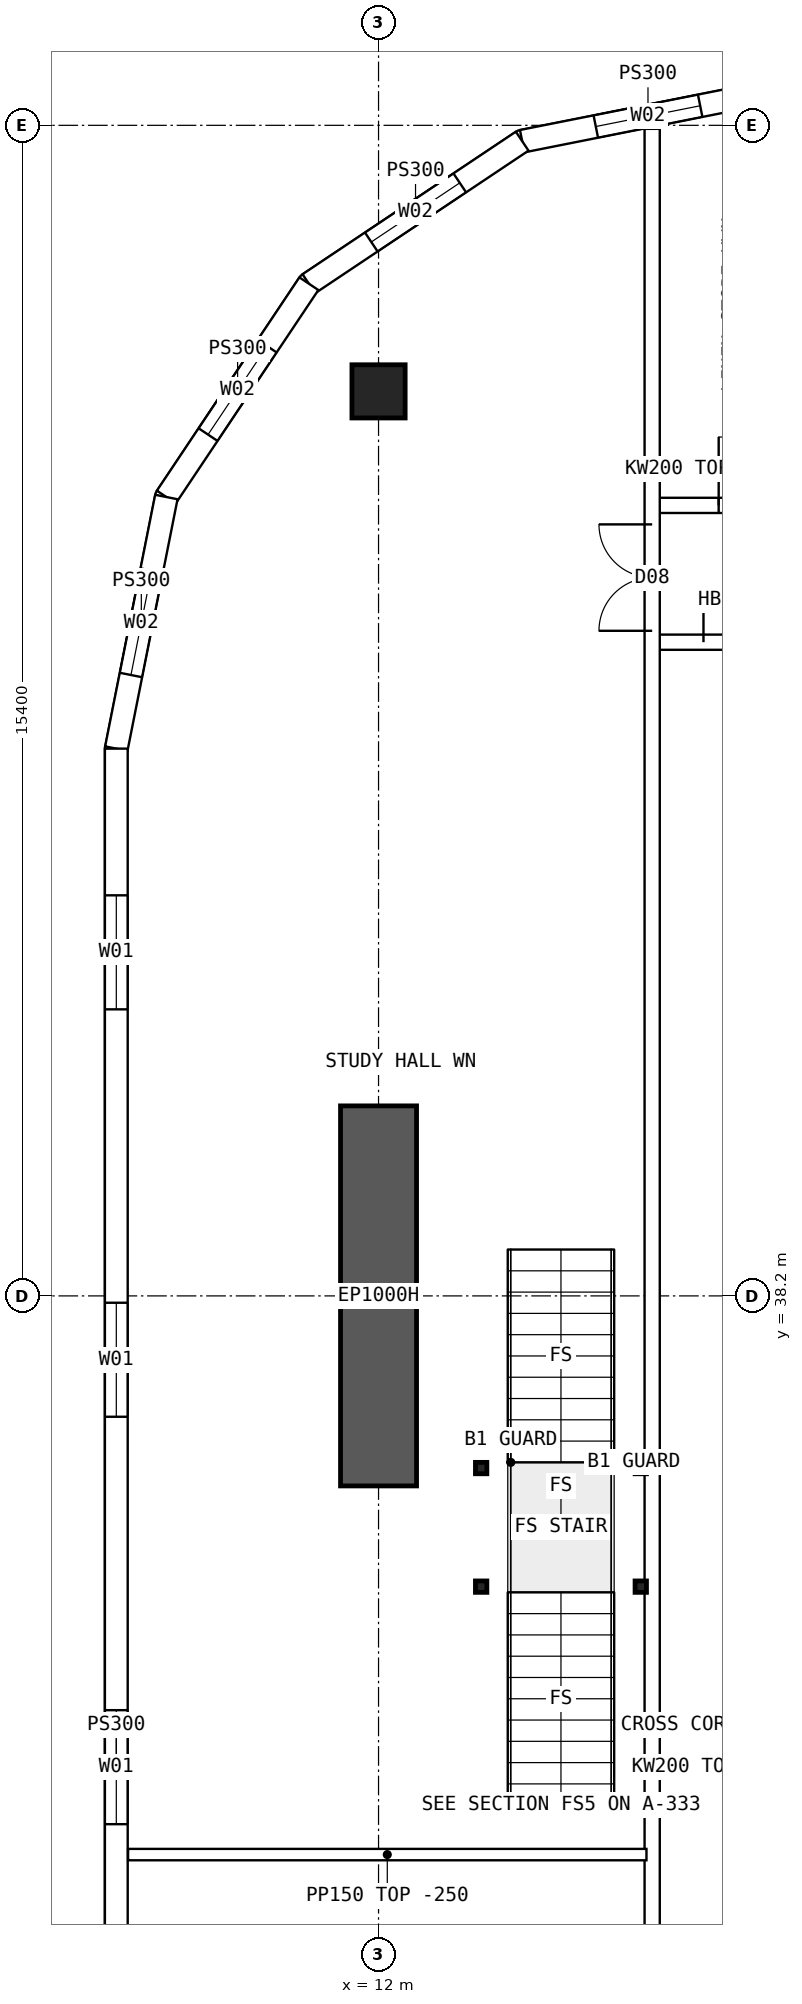
"""IFC4 building model, lengths in metres.
Left out: names, types, materials, properties, quantities, classifications, styles, units other than length and angle.
Written with IfcOpenShell. Run it as: python <this file> out.ifc"""

import sys

from ifc_helpers import new_model, si_unit, direction, frame, frame_2d, origin, origin_2d, place, context, subcontext, project, spatial, polyline, rectangle, hollow_rectangle, outline, extrude, element, fill, save


model = new_model("IFC4")
c1 = context("Model", 3, precision=1e-05, world=origin(), true_north=direction((0.0, 1.0)))
c2 = subcontext(c1, "Body", "Model", "MODEL_VIEW")
j1 = project(units=[si_unit("LENGTHUNIT", "METRE"), si_unit("PLANEANGLEUNIT", "RADIAN")], contexts=[c1])
p1 = place(None, origin())
s1 = spatial("IfcSite", under=j1, at=p1, CompositionType="ELEMENT")
p2 = place(p1, origin())
s2 = spatial("IfcBuilding", under=s1, at=p2, CompositionType="ELEMENT")
p3 = place(p2, frame((0.0, 0.0, 178.6)))
s3 = spatial("IfcBuildingStorey", under=s2, at=p3, CompositionType="ELEMENT", Elevation=178.6)
p4 = place(p3, frame((12.0, 50.1, 0.0), z_axis=(0.0, 0.0, 1.0), x_axis=(1.0, 0.0, 0.0)))
e1 = element("IfcColumn", 1, at=p4, inside=s3, PredefinedType="COLUMN", context=c2, shape_type="SweptSolid", body=[
    extrude(hollow_rectangle(XDim=0.7, YDim=0.7, WallThickness=0.07, at=origin_2d()), origin(), (0.0, 0.0, 1.0), 3.75),
])
p5 = place(p3, frame((12.0, 35.7, 0.0), z_axis=(0.0, 0.0, 1.0), x_axis=(0.0, 1.0, 0.0)))
e2 = element("IfcWall", 2, at=p5, inside=s3, PredefinedType="SHEAR", context=c2, shape_type="SweptSolid", body=[
    extrude(rectangle(XDim=5.0, YDim=1.0, at=frame_2d((2.5, 0.0))), origin(), (0.0, 0.0, 1.0), 3.75),
])
p6 = place(p3, frame((8.55, 45.4, 0.0), z_axis=(0.0, 0.0, 1.0), x_axis=(0.0, -1.0, 0.0)))
e3 = element("IfcWall", 3, at=p6, inside=s3, PredefinedType="SOLIDWALL", context=c2, shape_type="SweptSolid", body=[
    extrude(outline(polyline([(-0.015, -0.15), (26.815, -0.15), (26.785, 0.15), (0.015, 0.15), (-0.015, -0.15)])), origin(), (0.0, 0.0, 1.0), 3.5),
])
p7 = place(p6, frame((1.93, 0.0, 0.9)))
e4 = element("IfcOpeningElement", 4, at=p7, cuts=e3, PredefinedType="OPENING", context=c2, shape_type="SweptSolid", body=[
    extrude(rectangle(XDim=1.5, YDim=2.0, at=frame_2d((0.75, 1.0))), frame((0.0, 0.16, 0.0), z_axis=(0.0, -1.0, 0.0), x_axis=(1.0, 0.0, 0.0)), (0.0, 0.0, 1.0), 0.32),
])
p8 = place(p6, frame((7.29, 0.0, 0.9)))
e5 = element("IfcOpeningElement", 5, at=p8, cuts=e3, PredefinedType="OPENING", context=c2, shape_type="SweptSolid", body=[
    extrude(rectangle(XDim=1.5, YDim=2.0, at=frame_2d((0.75, 1.0))), frame((0.0, 0.16, 0.0), z_axis=(0.0, -1.0, 0.0), x_axis=(1.0, 0.0, 0.0)), (0.0, 0.0, 1.0), 0.32),
])
p9 = place(p6, frame((12.65, 0.0, 0.9)))
e6 = element("IfcOpeningElement", 6, at=p9, cuts=e3, PredefinedType="OPENING", context=c2, shape_type="SweptSolid", body=[
    extrude(rectangle(XDim=1.5, YDim=2.0, at=frame_2d((0.75, 1.0))), frame((0.0, 0.16, 0.0), z_axis=(0.0, -1.0, 0.0), x_axis=(1.0, 0.0, 0.0)), (0.0, 0.0, 1.0), 0.32),
])
p10 = place(p6, frame((18.01, 0.0, 0.9)))
e7 = element("IfcOpeningElement", 7, at=p10, cuts=e3, PredefinedType="OPENING", context=c2, shape_type="SweptSolid", body=[
    extrude(rectangle(XDim=1.5, YDim=2.0, at=frame_2d((0.75, 1.0))), frame((0.0, 0.16, 0.0), z_axis=(0.0, -1.0, 0.0), x_axis=(1.0, 0.0, 0.0)), (0.0, 0.0, 1.0), 0.32),
])
p11 = place(p6, frame((23.37, 0.0, 0.9)))
e8 = element("IfcOpeningElement", 8, at=p11, cuts=e3, PredefinedType="OPENING", context=c2, shape_type="SweptSolid", body=[
    extrude(rectangle(XDim=1.5, YDim=2.0, at=frame_2d((0.75, 1.0))), frame((0.0, 0.16, 0.0), z_axis=(0.0, -1.0, 0.0), x_axis=(1.0, 0.0, 0.0)), (0.0, 0.0, 1.0), 0.32),
])
p12 = place(p3, frame((17.2, 54.05, 0.0), z_axis=(0.0, 0.0, 1.0), x_axis=(-0.98078325777, -0.195100490205, 0.0)))
e9 = element("IfcWall", 9, at=p12, inside=s3, PredefinedType="SOLIDWALL", context=c2, shape_type="SweptSolid", body=[
    extrude(outline(polyline([(-0.03, -0.15), (3.405, -0.15), (3.345, 0.15), (0.03, 0.15), (-0.03, -0.15)])), origin(), (0.0, 0.0, 1.0), 3.5),
])
p13 = place(p12, frame((0.988, 0.0, 0.9)))
e10 = element("IfcOpeningElement", 10, at=p13, cuts=e9, PredefinedType="OPENING", context=c2, shape_type="SweptSolid", body=[
    extrude(rectangle(XDim=1.4, YDim=1.8, at=frame_2d((0.7, 0.9))), frame((0.0, 0.16, 0.0), z_axis=(0.0, -1.0, 0.0), x_axis=(1.0, 0.0, 0.0)), (0.0, 0.0, 1.0), 0.32),
])
p14 = place(p3, frame((13.89, 53.392, 0.0), z_axis=(0.0, 0.0, 1.0), x_axis=(-0.831493450887, -0.555534554399, 0.0)))
e11 = element("IfcWall", 11, at=p14, inside=s3, PredefinedType="SOLIDWALL", context=c2, shape_type="SweptSolid", body=[
    extrude(outline(polyline([(-0.03, -0.15), (3.405, -0.15), (3.345, 0.15), (0.03, 0.15), (-0.03, -0.15)])), origin(), (0.0, 0.0, 1.0), 3.5),
])
p15 = place(p14, frame((0.988, 0.0, 0.9)))
e12 = element("IfcOpeningElement", 12, at=p15, cuts=e11, PredefinedType="OPENING", context=c2, shape_type="SweptSolid", body=[
    extrude(rectangle(XDim=1.4, YDim=1.8, at=frame_2d((0.7, 0.9))), frame((0.0, 0.16, 0.0), z_axis=(0.0, -1.0, 0.0), x_axis=(1.0, 0.0, 0.0)), (0.0, 0.0, 1.0), 0.32),
])
p16 = place(p3, frame((11.083, 51.517, 0.0), z_axis=(0.0, 0.0, 1.0), x_axis=(-0.555534554399, -0.831493450887, 0.0)))
e13 = element("IfcWall", 13, at=p16, inside=s3, PredefinedType="SOLIDWALL", context=c2, shape_type="SweptSolid", body=[
    extrude(outline(polyline([(-0.03, -0.15), (3.405, -0.15), (3.345, 0.15), (0.03, 0.15), (-0.03, -0.15)])), origin(), (0.0, 0.0, 1.0), 3.5),
])
p17 = place(p16, frame((0.988, 0.0, 0.9)))
e14 = element("IfcOpeningElement", 14, at=p17, cuts=e13, PredefinedType="OPENING", context=c2, shape_type="SweptSolid", body=[
    extrude(rectangle(XDim=1.4, YDim=1.8, at=frame_2d((0.7, 0.9))), frame((0.0, 0.16, 0.0), z_axis=(0.0, -1.0, 0.0), x_axis=(1.0, 0.0, 0.0)), (0.0, 0.0, 1.0), 0.32),
])
p18 = place(p3, frame((9.208, 48.71, 0.0), z_axis=(0.0, 0.0, 1.0), x_axis=(-0.19508664885, -0.980786011034, 0.0)))
e15 = element("IfcWall", 15, at=p18, inside=s3, PredefinedType="SOLIDWALL", context=c2, shape_type="SweptSolid", body=[
    extrude(outline(polyline([(-0.03, -0.15), (3.39, -0.15), (3.36, 0.15), (0.03, 0.15), (-0.03, -0.15)])), origin(), (0.0, 0.0, 1.0), 3.5),
])
p19 = place(p18, frame((0.988, 0.0, 0.9)))
e16 = element("IfcOpeningElement", 16, at=p19, cuts=e15, PredefinedType="OPENING", context=c2, shape_type="SweptSolid", body=[
    extrude(rectangle(XDim=1.4, YDim=1.8, at=frame_2d((0.7, 0.9))), frame((0.0, 0.16, 0.0), z_axis=(0.0, -1.0, 0.0), x_axis=(1.0, 0.0, 0.0)), (0.0, 0.0, 1.0), 0.32),
])
p20 = place(p3, frame((15.6, 48.6, 0.0), z_axis=(0.0, 0.0, 1.0), x_axis=(1.0, 0.0, 0.0)))
e17 = element("IfcWall", 17, at=p20, inside=s3, PredefinedType="SOLIDWALL", context=c2, shape_type="SweptSolid", body=[
    extrude(rectangle(XDim=1.975, YDim=0.2, at=frame_2d((0.987, 0.0))), origin(), (0.0, 0.0, 1.0), 3.5),
])
p21 = place(p20, frame((0.875, 0.0, 0.0)))
e18 = element("IfcOpeningElement", 18, at=p21, cuts=e17, PredefinedType="OPENING", context=c2, shape_type="SweptSolid", body=[
    extrude(rectangle(XDim=0.9, YDim=2.1, at=frame_2d((0.45, 1.05))), frame((0.0, 0.11, 0.0), z_axis=(0.0, -1.0, 0.0), x_axis=(1.0, 0.0, 0.0)), (0.0, 0.0, 1.0), 0.22),
])
p22 = place(p3, frame((15.6, 46.8, 0.0), z_axis=(0.0, 0.0, 1.0), x_axis=(1.0, 0.0, 0.0)))
e19 = element("IfcWall", 19, at=p22, inside=s3, PredefinedType="SOLIDWALL", context=c2, shape_type="SweptSolid", body=[
    extrude(rectangle(XDim=1.975, YDim=0.2, at=frame_2d((0.987, 0.0))), origin(), (0.0, 0.0, 1.0), 3.5),
])
p23 = place(p22, frame((0.675, 0.0, 0.0)))
e20 = element("IfcOpeningElement", 20, at=p23, cuts=e19, PredefinedType="OPENING", context=c2, shape_type="SweptSolid", body=[
    extrude(rectangle(XDim=1.2, YDim=2.1, at=frame_2d((0.6, 1.05))), frame((0.0, 0.11, 0.0), z_axis=(0.0, -1.0, 0.0), x_axis=(1.0, 0.0, 0.0)), (0.0, 0.0, 1.0), 0.22),
])
p24 = place(p3, frame((8.705, 30.85, 0.0), z_axis=(0.0, 0.0, 1.0), x_axis=(1.0, 0.0, 0.0)))
e21 = element("IfcWall", 21, at=p24, inside=s3, PredefinedType="PARTITIONING", context=c2, shape_type="SweptSolid", body=[
    extrude(outline(polyline([(0.0, 0.0), (6.82, 0.0), (6.82, 3.5), (3.597, 3.5), (3.595, 3.05), (2.997, 3.05), (2.995, 3.5), (0.0, 3.5), (0.0, 0.0)])), frame((0.0, 0.075, 0.0), z_axis=(0.0, -1.0, 0.0), x_axis=(1.0, 0.0, 0.0)), (0.0, 0.0, 1.0), 0.15),
])
p25 = place(p3, frame((15.6, 10.446, 0.0), z_axis=(0.0, 0.0, 1.0), x_axis=(0.0, 1.0, 0.0)))
e22 = element("IfcWall", 22, at=p25, inside=s3, PredefinedType="SOLIDWALL", context=c2, shape_type="SweptSolid", body=[
    extrude(rectangle(XDim=43.107, YDim=0.2, at=frame_2d((21.554, 0.0))), origin(), (0.0, 0.0, 1.0), 3.5),
])
p26 = place(p25, frame((5.104, 0.0, 0.0)))
e23 = element("IfcOpeningElement", 23, at=p26, cuts=e22, PredefinedType="OPENING", context=c2, shape_type="SweptSolid", body=[
    extrude(rectangle(XDim=1.4, YDim=2.1, at=frame_2d((0.7, 1.05))), frame((0.0, 0.11, 0.0), z_axis=(0.0, -1.0, 0.0), x_axis=(1.0, 0.0, 0.0)), (0.0, 0.0, 1.0), 0.22),
])
p27 = place(p25, frame((36.504, 0.0, 0.0)))
e24 = element("IfcOpeningElement", 24, at=p27, cuts=e22, PredefinedType="OPENING", context=c2, shape_type="SweptSolid", body=[
    extrude(rectangle(XDim=1.4, YDim=2.1, at=frame_2d((0.7, 1.05))), frame((0.0, 0.11, 0.0), z_axis=(0.0, -1.0, 0.0), x_axis=(1.0, 0.0, 0.0)), (0.0, 0.0, 1.0), 0.22),
])
for number, where, z_axis, x_axis in (
    (25, (13.35, 34.375, 0.0), (0.0, 0.0, 1.0), (1.0, 0.0, 0.0)),
    (26, (15.45, 34.375, 0.0), (0.0, 0.0, 1.0), (1.0, 0.0, 0.0)),
    (27, (13.35, 35.935, 0.0), (0.0, 0.0, 1.0), (1.0, 0.0, 0.0)),
    (28, (15.45, 35.935, 0.0), (0.0, 0.0, 1.0), (1.0, 0.0, 0.0)),
):
    element("IfcColumn", number, at=place(p3, frame(where, z_axis=z_axis, x_axis=x_axis)), inside=s3, PredefinedType="COLUMN", context=c2, shape_type="SweptSolid", body=[
        extrude(hollow_rectangle(XDim=0.15, YDim=0.15, WallThickness=0.008, at=origin_2d()), origin(), (0.0, 0.0, 1.0), 3.5),
    ])
p28 = place(p7, origin())
e29 = element("IfcWindow", 29, at=p28, inside=s3, PartitioningType="SINGLE_PANEL", PredefinedType="WINDOW", context=c2, shape_type="SweptSolid", body=[
    extrude(rectangle(XDim=1.5, YDim=2.0, at=frame_2d((0.75, 1.0))), frame((0.0, 0.03, 0.0), z_axis=(0.0, -1.0, 0.0), x_axis=(1.0, 0.0, 0.0)), (0.0, 0.0, 1.0), 0.06),
])
fill(e4, e29)
p29 = place(p8, origin())
e30 = element("IfcWindow", 30, at=p29, inside=s3, PartitioningType="SINGLE_PANEL", PredefinedType="WINDOW", context=c2, shape_type="SweptSolid", body=[
    extrude(rectangle(XDim=1.5, YDim=2.0, at=frame_2d((0.75, 1.0))), frame((0.0, 0.03, 0.0), z_axis=(0.0, -1.0, 0.0), x_axis=(1.0, 0.0, 0.0)), (0.0, 0.0, 1.0), 0.06),
])
fill(e5, e30)
p30 = place(p9, origin())
e31 = element("IfcWindow", 31, at=p30, inside=s3, PartitioningType="SINGLE_PANEL", PredefinedType="WINDOW", context=c2, shape_type="SweptSolid", body=[
    extrude(rectangle(XDim=1.5, YDim=2.0, at=frame_2d((0.75, 1.0))), frame((0.0, 0.03, 0.0), z_axis=(0.0, -1.0, 0.0), x_axis=(1.0, 0.0, 0.0)), (0.0, 0.0, 1.0), 0.06),
])
fill(e6, e31)
p31 = place(p13, origin())
e32 = element("IfcWindow", 32, at=p31, inside=s3, PartitioningType="SINGLE_PANEL", PredefinedType="WINDOW", context=c2, shape_type="SweptSolid", body=[
    extrude(rectangle(XDim=1.4, YDim=1.8, at=frame_2d((0.7, 0.9))), frame((0.0, 0.03, 0.0), z_axis=(0.0, -1.0, 0.0), x_axis=(1.0, 0.0, 0.0)), (0.0, 0.0, 1.0), 0.06),
])
fill(e10, e32)
p32 = place(p15, origin())
e33 = element("IfcWindow", 33, at=p32, inside=s3, PartitioningType="SINGLE_PANEL", PredefinedType="WINDOW", context=c2, shape_type="SweptSolid", body=[
    extrude(rectangle(XDim=1.4, YDim=1.8, at=frame_2d((0.7, 0.9))), frame((0.0, 0.03, 0.0), z_axis=(0.0, -1.0, 0.0), x_axis=(1.0, 0.0, 0.0)), (0.0, 0.0, 1.0), 0.06),
])
fill(e12, e33)
p33 = place(p17, origin())
e34 = element("IfcWindow", 34, at=p33, inside=s3, PartitioningType="SINGLE_PANEL", PredefinedType="WINDOW", context=c2, shape_type="SweptSolid", body=[
    extrude(rectangle(XDim=1.4, YDim=1.8, at=frame_2d((0.7, 0.9))), frame((0.0, 0.03, 0.0), z_axis=(0.0, -1.0, 0.0), x_axis=(1.0, 0.0, 0.0)), (0.0, 0.0, 1.0), 0.06),
])
fill(e14, e34)
p34 = place(p19, origin())
e35 = element("IfcWindow", 35, at=p34, inside=s3, PartitioningType="SINGLE_PANEL", PredefinedType="WINDOW", context=c2, shape_type="SweptSolid", body=[
    extrude(rectangle(XDim=1.4, YDim=1.8, at=frame_2d((0.7, 0.9))), frame((0.0, 0.03, 0.0), z_axis=(0.0, -1.0, 0.0), x_axis=(1.0, 0.0, 0.0)), (0.0, 0.0, 1.0), 0.06),
])
fill(e16, e35)
p35 = place(p23, origin())
e36 = element("IfcDoor", 36, at=p35, inside=s3, OperationType="DOUBLE_DOOR_SINGLE_SWING", PredefinedType="DOOR", context=c2, shape_type="SweptSolid", body=[
    extrude(rectangle(XDim=1.2, YDim=2.1, at=frame_2d((0.6, 1.05))), frame((0.0, 0.025, 0.0), z_axis=(0.0, -1.0, 0.0), x_axis=(1.0, 0.0, 0.0)), (0.0, 0.0, 1.0), 0.05),
])
fill(e20, e36)
p36 = place(p27, origin())
e37 = element("IfcDoor", 37, at=p36, inside=s3, OperationType="DOUBLE_DOOR_SINGLE_SWING", PredefinedType="DOOR", context=c2, shape_type="SweptSolid", body=[
    extrude(rectangle(XDim=1.4, YDim=2.1, at=frame_2d((0.7, 1.05))), frame((0.0, 0.025, 0.0), z_axis=(0.0, -1.0, 0.0), x_axis=(1.0, 0.0, 0.0)), (0.0, 0.0, 1.0), 0.05),
])
fill(e24, e37)
p37 = place(p21, origin())
e38 = element("IfcDoor", 38, at=p37, inside=s3, OperationType="SINGLE_SWING_LEFT", PredefinedType="DOOR", context=c2, shape_type="SweptSolid", body=[
    extrude(rectangle(XDim=0.9, YDim=2.1, at=frame_2d((0.45, 1.05))), frame((0.0, 0.025, 0.0), z_axis=(0.0, -1.0, 0.0), x_axis=(1.0, 0.0, 0.0)), (0.0, 0.0, 1.0), 0.05),
])
fill(e18, e38)
save(model, sys.argv[1])
